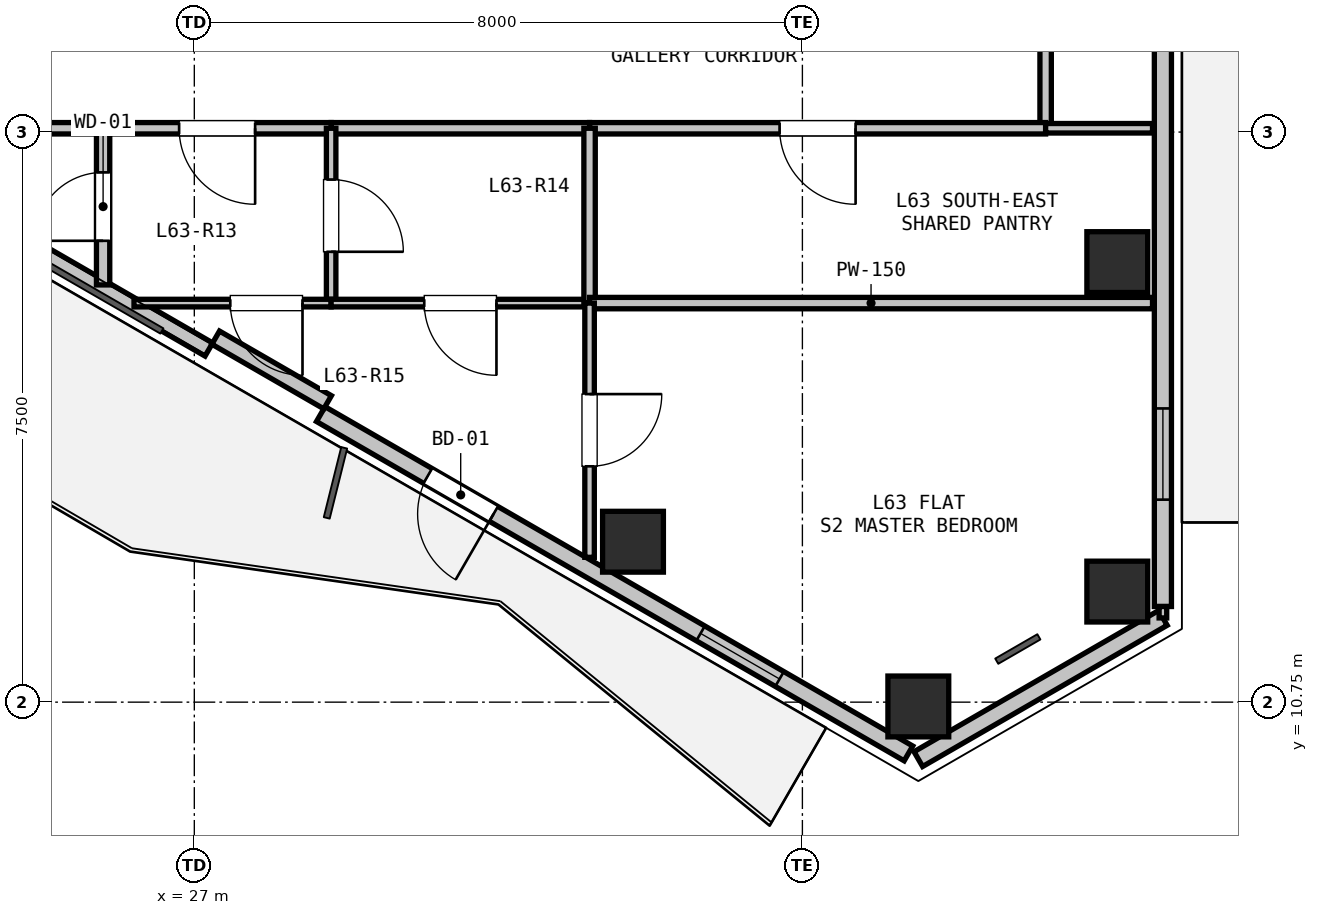
"""IFC4 building model, lengths in metres.
Left out: names, types, materials, properties, quantities, classifications, styles, units other than length and angle.
Written with IfcOpenShell. Run it as: python <this file> out.ifc"""

import sys

from ifc_helpers import new_model, si_unit, direction, frame, frame_2d, origin, origin_2d, place, context, subcontext, project, spatial, rectangle, hollow_rectangle, extrude, element, fill, save


model = new_model("IFC4")
c1 = context("Model", 3, precision=1e-05, world=origin(), true_north=direction((0.0, 1.0)))
c2 = subcontext(c1, "Body", "Model", "MODEL_VIEW")
j1 = project(units=[si_unit("LENGTHUNIT", "METRE"), si_unit("PLANEANGLEUNIT", "RADIAN")], contexts=[c1])
p1 = place(None, origin())
s1 = spatial("IfcSite", under=j1, at=p1, CompositionType="ELEMENT")
p2 = place(p1, origin())
s2 = spatial("IfcBuilding", under=s1, at=p2, CompositionType="ELEMENT")
p3 = place(p2, frame((0.0, 0.0, 226.5)))
s3 = spatial("IfcBuildingStorey", under=s2, at=p3, CompositionType="ELEMENT", Elevation=226.5)
for number, where, z_axis, x_axis in (
    (1, (39.143, 16.539, 0.0), (0.0, 0.0, 1.0), (1.0, 0.0, 0.0)),
    (2, (39.143, 12.205, 0.0), (0.0, 0.0, 1.0), (1.0, 0.0, 0.0)),
    (3, (36.525, 10.693, 0.0), (0.0, 0.0, 1.0), (1.0, 0.0, 0.0)),
    (4, (32.771, 12.861, 0.0), (0.0, 0.0, 1.0), (1.0, 0.0, 0.0)),
):
    element("IfcColumn", number, at=place(p3, frame(where, z_axis=z_axis, x_axis=x_axis)), inside=s3, PredefinedType="COLUMN", context=c2, shape_type="SweptSolid", body=[
        extrude(hollow_rectangle(XDim=0.8, YDim=0.8, WallThickness=0.025, at=origin_2d()), origin(), (0.0, 0.0, 1.0), 3.3),
    ])
p4 = place(p3, frame((39.743, 11.858, 0.0), z_axis=(0.0, 0.0, 1.0), x_axis=(-0.866038962515, -0.499976514854, 0.0)))
e5 = element("IfcWall", 5, at=p4, inside=s3, PredefinedType="SOLIDWALL", context=c2, shape_type="SweptSolid", body=[
    extrude(rectangle(XDim=3.716, YDim=0.225, at=frame_2d((1.858, 0.0))), origin(), (0.0, 0.0, 1.0), 2.7),
])
p5 = place(p3, frame((39.743, 20.936, 0.0), z_axis=(0.0, 0.0, 1.0), x_axis=(0.0, -1.0, 0.0)))
e6 = element("IfcWall", 6, at=p5, inside=s3, PredefinedType="SOLIDWALL", context=c2, shape_type="SweptSolid", body=[
    extrude(rectangle(XDim=8.928, YDim=0.225, at=frame_2d((4.464, 0.0))), origin(), (0.0, 0.0, 1.0), 2.7),
])
p6 = place(p5, frame((6.322, 0.0, 0.9)))
e7 = element("IfcOpeningElement", 7, at=p6, cuts=e6, PredefinedType="OPENING", context=c2, shape_type="SweptSolid", body=[
    extrude(rectangle(XDim=1.2, YDim=1.4, at=frame_2d((0.6, 0.7))), frame((0.0, 0.123, 0.0), z_axis=(0.0, -1.0, 0.0), x_axis=(1.0, 0.0, 0.0)), (0.0, 0.0, 1.0), 0.245),
])
p7 = place(p3, frame((36.395, 10.076, 0.0), z_axis=(0.0, 0.0, 1.0), x_axis=(-0.866026655105, 0.499997832642, 0.0)))
e8 = element("IfcWall", 8, at=p7, inside=s3, PredefinedType="SOLIDWALL", context=c2, shape_type="SweptSolid", body=[
    extrude(rectangle(XDim=8.928, YDim=0.225, at=frame_2d((4.464, 0.0))), origin(), (0.0, 0.0, 1.0), 2.7),
])
p8 = place(p7, frame((6.302, 0.0, 0.0)))
e9 = element("IfcOpeningElement", 9, at=p8, cuts=e8, PredefinedType="OPENING", context=c2, shape_type="SweptSolid", body=[
    extrude(rectangle(XDim=1.0, YDim=2.1, at=frame_2d((0.5, 1.05))), frame((0.0, 0.123, 0.0), z_axis=(0.0, -1.0, 0.0), x_axis=(1.0, 0.0, 0.0)), (0.0, 0.0, 1.0), 0.245),
])
p9 = place(p7, frame((1.958, 0.0, 0.9)))
e10 = element("IfcOpeningElement", 10, at=p9, cuts=e8, PredefinedType="OPENING", context=c2, shape_type="SweptSolid", body=[
    extrude(rectangle(XDim=1.2, YDim=1.4, at=frame_2d((0.6, 0.7))), frame((0.0, 0.123, 0.0), z_axis=(0.0, -1.0, 0.0), x_axis=(1.0, 0.0, 0.0)), (0.0, 0.0, 1.0), 0.245),
])
p10 = place(p3, frame((27.191, 15.389, 0.0), z_axis=(0.0, 0.0, 1.0), x_axis=(-0.866019557082, 0.500010126649, 0.0)))
e11 = element("IfcWall", 11, at=p10, inside=s3, PredefinedType="PARAPET", context=c2, shape_type="SweptSolid", body=[
    extrude(rectangle(XDim=8.228, YDim=0.2, at=frame_2d((4.114, 0.0))), origin(), (0.0, 0.0, 1.0), 0.2),
])
p11 = place(p3, frame((28.754, 14.695, 0.0), z_axis=(0.0, 0.0, 1.0), x_axis=(-0.866025371046, 0.500000056704, 0.0)))
e12 = element("IfcWall", 12, at=p11, inside=s3, PredefinedType="PARAPET", context=c2, shape_type="SweptSolid", body=[
    extrude(rectangle(XDim=1.7, YDim=0.2, at=frame_2d((0.85, 0.0))), origin(), (0.0, 0.0, 1.0), 2.7),
])
p12 = place(p3, frame((38.2, 20.75, 0.0), z_axis=(0.0, 0.0, 1.0), x_axis=(0.0, -1.0, 0.0)))
e13 = element("IfcWall", 13, at=p12, inside=s3, PredefinedType="PARTITIONING", context=c2, shape_type="SweptSolid", body=[
    extrude(rectangle(XDim=2.45, YDim=0.15, at=frame_2d((1.225, 0.0))), origin(), (0.0, 0.0, 1.0), 3.08),
])
p13 = place(p3, frame((38.2, 18.3, 0.0), z_axis=(0.0, 0.0, 1.0), x_axis=(-1.0, 0.0, 0.0)))
e14 = element("IfcWall", 14, at=p13, inside=s3, PredefinedType="PARTITIONING", context=c2, shape_type="SweptSolid", body=[
    extrude(rectangle(XDim=6.0, YDim=0.15, at=frame_2d((3.0, 0.0))), origin(), (0.0, 0.0, 1.0), 2.528),
])
p14 = place(p13, frame((2.5, 0.0, 0.0)))
e15 = element("IfcOpeningElement", 15, at=p14, cuts=e14, PredefinedType="OPENING", context=c2, shape_type="SweptSolid", body=[
    extrude(rectangle(XDim=1.0, YDim=2.15, at=frame_2d((0.5, 1.075))), frame((0.0, 0.085, 0.0), z_axis=(0.0, -1.0, 0.0), x_axis=(1.0, 0.0, 0.0)), (0.0, 0.0, 1.0), 0.17),
])
p15 = place(p3, frame((32.2, 18.3, 0.0), z_axis=(0.0, 0.0, 1.0), x_axis=(-1.0, 0.0, 0.0)))
e16 = element("IfcWall", 16, at=p15, inside=s3, PredefinedType="PARTITIONING", context=c2, shape_type="SweptSolid", body=[
    extrude(rectangle(XDim=3.4, YDim=0.15, at=frame_2d((1.7, 0.0))), origin(), (0.0, 0.0, 1.0), 3.08),
])
p16 = place(p3, frame((28.8, 18.3, 0.0), z_axis=(0.0, 0.0, 1.0), x_axis=(-1.0, 0.0, 0.0)))
e17 = element("IfcWall", 17, at=p16, inside=s3, PredefinedType="PARTITIONING", context=c2, shape_type="SweptSolid", body=[
    extrude(rectangle(XDim=3.0, YDim=0.15, at=frame_2d((1.5, 0.0))), origin(), (0.0, 0.0, 1.0), 3.08),
])
p17 = place(p16, frame((1.0, 0.0, 0.0)))
e18 = element("IfcOpeningElement", 18, at=p17, cuts=e17, PredefinedType="OPENING", context=c2, shape_type="SweptSolid", body=[
    extrude(rectangle(XDim=1.0, YDim=2.15, at=frame_2d((0.5, 1.075))), frame((0.0, 0.085, 0.0), z_axis=(0.0, -1.0, 0.0), x_axis=(1.0, 0.0, 0.0)), (0.0, 0.0, 1.0), 0.17),
])
p18 = place(p3, frame((25.8, 18.3, 0.0), z_axis=(0.0, 0.0, 1.0), x_axis=(-1.0, 0.0, 0.0)))
e19 = element("IfcWall", 19, at=p18, inside=s3, PredefinedType="PARTITIONING", context=c2, shape_type="SweptSolid", body=[
    extrude(rectangle(XDim=2.2, YDim=0.15, at=frame_2d((1.1, 0.0))), origin(), (0.0, 0.0, 1.0), 2.365),
])
p19 = place(p3, frame((28.8, 18.3, 0.0), z_axis=(0.0, 0.0, 1.0), x_axis=(0.0, -1.0, 0.0)))
e20 = element("IfcWall", 20, at=p19, inside=s3, PredefinedType="PARTITIONING", context=c2, shape_type="SweptSolid", body=[
    extrude(rectangle(XDim=2.3, YDim=0.125, at=frame_2d((1.15, 0.0))), origin(), (0.0, 0.0, 1.0), 3.08),
])
p20 = place(p19, frame((0.675, 0.0, 0.0)))
e21 = element("IfcOpeningElement", 21, at=p20, cuts=e20, PredefinedType="OPENING", context=c2, shape_type="SweptSolid", body=[
    extrude(rectangle(XDim=0.95, YDim=2.1, at=frame_2d((0.475, 1.05))), frame((0.0, 0.073, 0.0), z_axis=(0.0, -1.0, 0.0), x_axis=(1.0, 0.0, 0.0)), (0.0, 0.0, 1.0), 0.145),
])
p21 = place(p3, frame((28.8, 16.0, 0.0), z_axis=(0.0, 0.0, 1.0), x_axis=(-1.0, 0.0, 0.0)))
e22 = element("IfcWall", 22, at=p21, inside=s3, PredefinedType="PARTITIONING", context=c2, shape_type="SweptSolid", body=[
    extrude(rectangle(XDim=2.594, YDim=0.1, at=frame_2d((1.297, 0.0))), origin(), (0.0, 0.0, 1.0), 2.365),
])
p22 = place(p21, frame((0.377, 0.0, 0.0)))
e23 = element("IfcOpeningElement", 23, at=p22, cuts=e22, PredefinedType="OPENING", context=c2, shape_type="SweptSolid", body=[
    extrude(rectangle(XDim=0.95, YDim=2.1, at=frame_2d((0.475, 1.05))), frame((0.0, 0.06, 0.0), z_axis=(0.0, -1.0, 0.0), x_axis=(1.0, 0.0, 0.0)), (0.0, 0.0, 1.0), 0.12),
])
p23 = place(p3, frame((25.8, 16.239, 0.0), z_axis=(0.0, 0.0, 1.0), x_axis=(0.0, 1.0, 0.0)))
e24 = element("IfcWall", 24, at=p23, inside=s3, PredefinedType="PLUMBINGWALL", context=c2, shape_type="SweptSolid", body=[
    extrude(rectangle(XDim=2.061, YDim=0.175, at=frame_2d((1.031, 0.0))), origin(), (0.0, 0.0, 1.0), 2.365),
])
p24 = place(p23, frame((0.581, 0.0, 0.0)))
e25 = element("IfcOpeningElement", 25, at=p24, cuts=e24, PredefinedType="OPENING", context=c2, shape_type="SweptSolid", body=[
    extrude(rectangle(XDim=0.9, YDim=2.1, at=frame_2d((0.45, 1.05))), frame((0.0, 0.097, 0.0), z_axis=(0.0, -1.0, 0.0), x_axis=(1.0, 0.0, 0.0)), (0.0, 0.0, 1.0), 0.195),
])
p25 = place(p3, frame((32.2, 16.0, 0.0), z_axis=(0.0, 0.0, 1.0), x_axis=(-1.0, 0.0, 0.0)))
e26 = element("IfcWall", 26, at=p25, inside=s3, PredefinedType="PARTITIONING", context=c2, shape_type="SweptSolid", body=[
    extrude(rectangle(XDim=3.4, YDim=0.1, at=frame_2d((1.7, 0.0))), origin(), (0.0, 0.0, 1.0), 3.08),
])
p26 = place(p25, frame((1.225, 0.0, 0.0)))
e27 = element("IfcOpeningElement", 27, at=p26, cuts=e26, PredefinedType="OPENING", context=c2, shape_type="SweptSolid", body=[
    extrude(rectangle(XDim=0.95, YDim=2.1, at=frame_2d((0.475, 1.05))), frame((0.0, 0.06, 0.0), z_axis=(0.0, -1.0, 0.0), x_axis=(1.0, 0.0, 0.0)), (0.0, 0.0, 1.0), 0.12),
])
p27 = place(p3, frame((32.2, 18.3, 0.0), z_axis=(0.0, 0.0, 1.0), x_axis=(0.0, -1.0, 0.0)))
e28 = element("IfcWall", 28, at=p27, inside=s3, PredefinedType="PARTITIONING", context=c2, shape_type="SweptSolid", body=[
    extrude(rectangle(XDim=2.3, YDim=0.15, at=frame_2d((1.15, 0.0))), origin(), (0.0, 0.0, 1.0), 3.08),
])
p28 = place(p3, frame((38.2, 18.3, 0.0), z_axis=(0.0, 0.0, 1.0), x_axis=(1.0, 0.0, 0.0)))
e29 = element("IfcWall", 29, at=p28, inside=s3, PredefinedType="PARTITIONING", context=c2, shape_type="SweptSolid", body=[
    extrude(rectangle(XDim=1.406, YDim=0.125, at=frame_2d((0.703, 0.0))), origin(), (0.0, 0.0, 1.0), 2.365),
])
p29 = place(p3, frame((39.606, 16.0, 0.0), z_axis=(0.0, 0.0, 1.0), x_axis=(-1.0, 0.0, 0.0)))
e30 = element("IfcWall", 30, at=p29, inside=s3, PredefinedType="PARTITIONING", context=c2, shape_type="SweptSolid", body=[
    extrude(rectangle(XDim=7.406, YDim=0.15, at=frame_2d((3.703, 0.0))), origin(), (0.0, 0.0, 1.0), 2.528),
])
p30 = place(p3, frame((32.2, 16.0, 0.0), z_axis=(0.0, 0.0, 1.0), x_axis=(0.0, -1.0, 0.0)))
e31 = element("IfcWall", 31, at=p30, inside=s3, PredefinedType="PARTITIONING", context=c2, shape_type="SweptSolid", body=[
    extrude(rectangle(XDim=3.344, YDim=0.125, at=frame_2d((1.672, 0.0))), origin(), (0.0, 0.0, 1.0), 2.365),
])
p31 = place(p30, frame((1.197, 0.0, 0.0)))
e32 = element("IfcOpeningElement", 32, at=p31, cuts=e31, PredefinedType="OPENING", context=c2, shape_type="SweptSolid", body=[
    extrude(rectangle(XDim=0.95, YDim=2.1, at=frame_2d((0.475, 1.05))), frame((0.0, 0.073, 0.0), z_axis=(0.0, -1.0, 0.0), x_axis=(1.0, 0.0, 0.0)), (0.0, 0.0, 1.0), 0.145),
])
p32 = place(p3, frame((39.743, 12.008, 0.0), z_axis=(0.0, 0.0, 1.0), x_axis=(0.0, -1.0, 0.0)))
e33 = element("IfcWall", 33, at=p32, inside=s3, PredefinedType="PARTITIONING", context=c2, shape_type="SweptSolid", body=[
    extrude(rectangle(XDim=0.15, YDim=0.1, at=frame_2d((0.075, 0.0))), origin(), (0.0, 0.0, 1.0), 3.08),
])
p33 = place(p6, origin())
e34 = element("IfcWindow", 34, at=p33, inside=s3, PartitioningType="SINGLE_PANEL", PredefinedType="WINDOW", context=c2, shape_type="SweptSolid", body=[
    extrude(rectangle(XDim=1.2, YDim=1.4, at=frame_2d((0.6, 0.7))), frame((0.0, 0.03, 0.0), z_axis=(0.0, -1.0, 0.0), x_axis=(1.0, 0.0, 0.0)), (0.0, 0.0, 1.0), 0.06),
])
fill(e7, e34)
p34 = place(p8, origin())
e35 = element("IfcDoor", 35, at=p34, inside=s3, OperationType="SINGLE_SWING_LEFT", PredefinedType="DOOR", context=c2, shape_type="SweptSolid", body=[
    extrude(rectangle(XDim=1.0, YDim=2.1, at=frame_2d((0.5, 1.05))), frame((0.0, 0.025, 0.0), z_axis=(0.0, -1.0, 0.0), x_axis=(1.0, 0.0, 0.0)), (0.0, 0.0, 1.0), 0.05),
])
fill(e9, e35)
p35 = place(p9, origin())
e36 = element("IfcWindow", 36, at=p35, inside=s3, PartitioningType="SINGLE_PANEL", PredefinedType="WINDOW", context=c2, shape_type="SweptSolid", body=[
    extrude(rectangle(XDim=1.2, YDim=1.4, at=frame_2d((0.6, 0.7))), frame((0.0, 0.03, 0.0), z_axis=(0.0, -1.0, 0.0), x_axis=(1.0, 0.0, 0.0)), (0.0, 0.0, 1.0), 0.06),
])
fill(e10, e36)
p36 = place(p17, origin())
e37 = element("IfcDoor", 37, at=p36, inside=s3, OperationType="SINGLE_SWING_LEFT", PredefinedType="DOOR", context=c2, shape_type="SweptSolid", body=[
    extrude(rectangle(XDim=1.0, YDim=2.15, at=frame_2d((0.5, 1.075))), frame((0.0, 0.025, 0.0), z_axis=(0.0, -1.0, 0.0), x_axis=(1.0, 0.0, 0.0)), (0.0, 0.0, 1.0), 0.05),
])
fill(e18, e37)
p37 = place(p14, origin())
e38 = element("IfcDoor", 38, at=p37, inside=s3, OperationType="SINGLE_SWING_LEFT", PredefinedType="DOOR", context=c2, shape_type="SweptSolid", body=[
    extrude(rectangle(XDim=1.0, YDim=2.15, at=frame_2d((0.5, 1.075))), frame((0.0, 0.025, 0.0), z_axis=(0.0, -1.0, 0.0), x_axis=(1.0, 0.0, 0.0)), (0.0, 0.0, 1.0), 0.05),
])
fill(e15, e38)
p38 = place(p24, origin())
e39 = element("IfcDoor", 39, at=p38, inside=s3, OperationType="SINGLE_SWING_LEFT", PredefinedType="DOOR", context=c2, shape_type="SweptSolid", body=[
    extrude(rectangle(XDim=0.9, YDim=2.1, at=frame_2d((0.45, 1.05))), frame((0.0, 0.025, 0.0), z_axis=(0.0, -1.0, 0.0), x_axis=(1.0, 0.0, 0.0)), (0.0, 0.0, 1.0), 0.05),
])
fill(e25, e39)
p39 = place(p20, origin())
e40 = element("IfcDoor", 40, at=p39, inside=s3, OperationType="SINGLE_SWING_RIGHT", PredefinedType="DOOR", context=c2, shape_type="SweptSolid", body=[
    extrude(rectangle(XDim=0.95, YDim=2.1, at=frame_2d((0.475, 1.05))), frame((0.0, 0.025, 0.0), z_axis=(0.0, -1.0, 0.0), x_axis=(1.0, 0.0, 0.0)), (0.0, 0.0, 1.0), 0.05),
])
fill(e21, e40)
p40 = place(p22, origin())
e41 = element("IfcDoor", 41, at=p40, inside=s3, OperationType="SINGLE_SWING_LEFT", PredefinedType="DOOR", context=c2, shape_type="SweptSolid", body=[
    extrude(rectangle(XDim=0.95, YDim=2.1, at=frame_2d((0.475, 1.05))), frame((0.0, 0.025, 0.0), z_axis=(0.0, -1.0, 0.0), x_axis=(1.0, 0.0, 0.0)), (0.0, 0.0, 1.0), 0.05),
])
fill(e23, e41)
p41 = place(p26, origin())
e42 = element("IfcDoor", 42, at=p41, inside=s3, OperationType="SINGLE_SWING_LEFT", PredefinedType="DOOR", context=c2, shape_type="SweptSolid", body=[
    extrude(rectangle(XDim=0.95, YDim=2.1, at=frame_2d((0.475, 1.05))), frame((0.0, 0.025, 0.0), z_axis=(0.0, -1.0, 0.0), x_axis=(1.0, 0.0, 0.0)), (0.0, 0.0, 1.0), 0.05),
])
fill(e27, e42)
p42 = place(p31, origin())
e43 = element("IfcDoor", 43, at=p42, inside=s3, OperationType="SINGLE_SWING_LEFT", PredefinedType="DOOR", context=c2, shape_type="SweptSolid", body=[
    extrude(rectangle(XDim=0.95, YDim=2.1, at=frame_2d((0.475, 1.05))), frame((0.0, 0.025, 0.0), z_axis=(0.0, -1.0, 0.0), x_axis=(1.0, 0.0, 0.0)), (0.0, 0.0, 1.0), 0.05),
])
fill(e32, e43)
save(model, sys.argv[1])
